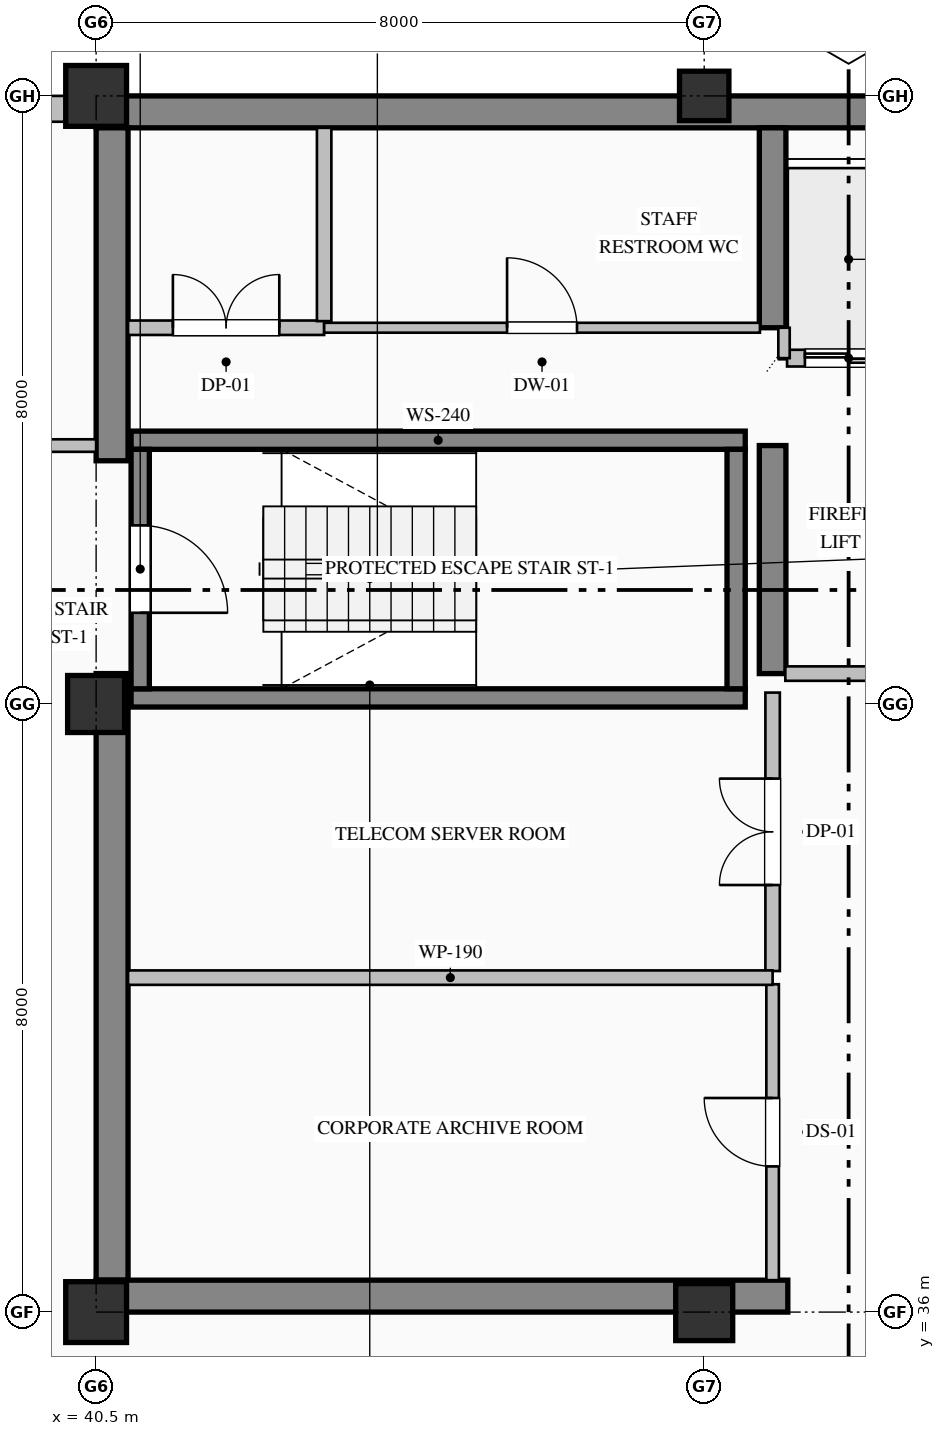
"""IFC4 building model, lengths in metres.
Left out: names, types, materials, properties, quantities, classifications, styles, units other than length and angle.
Written with IfcOpenShell. Run it as: python <this file> out.ifc"""

import sys

from ifc_helpers import new_model, si_unit, direction, frame, frame_2d, origin, origin_2d, place, context, subcontext, project, spatial, rectangle, hollow_rectangle, extrude, element, fill, save


model = new_model("IFC4")
c1 = context("Model", 3, precision=1e-05, world=origin(), true_north=direction((0.0, 1.0)))
c2 = subcontext(c1, "Body", "Model", "MODEL_VIEW")
j1 = project(units=[si_unit("LENGTHUNIT", "METRE"), si_unit("PLANEANGLEUNIT", "RADIAN")], contexts=[c1])
p1 = place(None, origin())
s1 = spatial("IfcSite", under=j1, at=p1, CompositionType="ELEMENT")
p2 = place(p1, origin())
s2 = spatial("IfcBuilding", under=s1, at=p2, CompositionType="ELEMENT")
p3 = place(p2, frame((0.0, 0.0, 359.2)))
s3 = spatial("IfcBuildingStorey", under=s2, at=p3, CompositionType="ELEMENT", Elevation=359.2)
p4 = place(p3, frame((40.5, 51.79, 0.0), z_axis=(0.0, 0.0, 1.0), x_axis=(1.0, 0.0, 0.0)))
e1 = element("IfcWall", 1, at=p4, inside=s3, PredefinedType="SHEAR", context=c2, shape_type="SweptSolid", body=[
    extrude(rectangle(XDim=23.5, YDim=0.42, at=frame_2d((11.75, 0.0))), origin(), (0.0, 0.0, 1.0), 3.785),
])
p5 = place(p3, frame((40.71, 36.42, 0.0), z_axis=(0.0, 0.0, 1.0), x_axis=(0.0, 1.0, 0.0)))
e2 = element("IfcWall", 2, at=p5, inside=s3, PredefinedType="SHEAR", context=c2, shape_type="SweptSolid", body=[
    extrude(rectangle(XDim=7.98, YDim=0.42, at=frame_2d((3.99, 0.0))), origin(), (0.0, 0.0, 1.0), 3.785),
])
p6 = place(p3, frame((40.71, 47.2, 0.0), z_axis=(0.0, 0.0, 1.0), x_axis=(0.0, 1.0, 0.0)))
e3 = element("IfcWall", 3, at=p6, inside=s3, PredefinedType="SHEAR", context=c2, shape_type="SweptSolid", body=[
    extrude(rectangle(XDim=4.38, YDim=0.42, at=frame_2d((2.19, 0.0))), origin(), (0.0, 0.0, 1.0), 3.785),
])
p7 = place(p3, frame((40.5, 36.21, 0.0), z_axis=(0.0, 0.0, 1.0), x_axis=(1.0, 0.0, 0.0)))
e4 = element("IfcWall", 4, at=p7, inside=s3, PredefinedType="SHEAR", context=c2, shape_type="SweptSolid", body=[
    extrude(rectangle(XDim=9.1, YDim=0.42, at=frame_2d((4.55, 0.0))), origin(), (0.0, 0.0, 1.0), 3.785),
])
p8 = place(p3, frame((49.4, 44.4, 0.0), z_axis=(0.0, 0.0, 1.0), x_axis=(0.0, 1.0, 0.0)))
e5 = element("IfcWall", 5, at=p8, inside=s3, PredefinedType="SHEAR", context=c2, shape_type="SweptSolid", body=[
    extrude(rectangle(XDim=3.0, YDim=0.35, at=frame_2d((1.5, 0.0))), origin(), (0.0, 0.0, 1.0), 3.785),
])
p9 = place(p3, frame((49.4, 48.95, 0.0), z_axis=(0.0, 0.0, 1.0), x_axis=(0.0, 1.0, 0.0)))
e6 = element("IfcWall", 6, at=p9, inside=s3, PredefinedType="SHEAR", context=c2, shape_type="SweptSolid", body=[
    extrude(rectangle(XDim=2.63, YDim=0.35, at=frame_2d((1.315, 0.0))), origin(), (0.0, 0.0, 1.0), 3.785),
])
p10 = place(p3, frame((40.5, 36.0, 0.0), z_axis=(0.0, 0.0, 1.0), x_axis=(1.0, 0.0, 0.0)))
e7 = element("IfcColumn", 7, at=p10, inside=s3, PredefinedType="COLUMN", context=c2, shape_type="SweptSolid", body=[
    extrude(hollow_rectangle(XDim=0.8, YDim=0.8, WallThickness=0.032, at=origin_2d()), origin(), (0.0, 0.0, 1.0), 4.0),
])
p11 = place(p3, frame((40.5, 44.0, 0.0), z_axis=(0.0, 0.0, 1.0), x_axis=(1.0, 0.0, 0.0)))
e8 = element("IfcColumn", 8, at=p11, inside=s3, PredefinedType="COLUMN", context=c2, shape_type="SweptSolid", body=[
    extrude(rectangle(XDim=0.75, YDim=0.75, at=origin_2d()), origin(), (0.0, 0.0, 1.0), 4.0),
])
p12 = place(p3, frame((40.5, 52.0, 0.0), z_axis=(0.0, 0.0, 1.0), x_axis=(1.0, 0.0, 0.0)))
e9 = element("IfcColumn", 9, at=p12, inside=s3, PredefinedType="COLUMN", context=c2, shape_type="SweptSolid", body=[
    extrude(hollow_rectangle(XDim=0.8, YDim=0.8, WallThickness=0.032, at=origin_2d()), origin(), (0.0, 0.0, 1.0), 4.0),
])
p13 = place(p3, frame((48.5, 36.0, 0.0), z_axis=(0.0, 0.0, 1.0), x_axis=(1.0, 0.0, 0.0)))
e10 = element("IfcColumn", 10, at=p13, inside=s3, PredefinedType="COLUMN", context=c2, shape_type="SweptSolid", body=[
    extrude(rectangle(XDim=0.75, YDim=0.75, at=origin_2d()), origin(), (0.0, 0.0, 1.0), 4.0),
])
p14 = place(p3, frame((48.5, 52.0, 0.0), z_axis=(0.0, 0.0, 1.0), x_axis=(1.0, 0.0, 0.0)))
e11 = element("IfcColumn", 11, at=p14, inside=s3, PredefinedType="COLUMN", context=c2, shape_type="SweptSolid", body=[
    extrude(hollow_rectangle(XDim=0.65, YDim=0.65, WallThickness=0.028, at=origin_2d()), origin(), (0.0, 0.0, 1.0), 4.0),
])
p15 = place(p3, frame((20.5, 51.83, 0.0), z_axis=(0.0, 0.0, 1.0), x_axis=(1.0, 0.0, 0.0)))
e12 = element("IfcWall", 12, at=p15, inside=s3, PredefinedType="SOLIDWALL", context=c2, shape_type="SweptSolid", body=[
    extrude(rectangle(XDim=20.02, YDim=0.34, at=frame_2d((10.01, 0.0))), origin(), (0.0, 0.0, 1.0), 3.335),
])
p16 = place(p15, frame((6.725, 0.0, 0.9)))
e13 = element("IfcOpeningElement", 13, at=p16, cuts=e12, PredefinedType="OPENING", context=c2, shape_type="SweptSolid", body=[
    extrude(rectangle(XDim=0.95, YDim=1.85, at=frame_2d((0.475, 0.925))), frame((0.0, 0.18, 0.0), z_axis=(0.0, -1.0, 0.0), x_axis=(1.0, 0.0, 0.0)), (0.0, 0.0, 1.0), 0.36),
])
for number, where, z_axis, x_axis in (
    (14, (40.96, 47.47, 0.0), (0.0, 0.0, 1.0), (1.0, 0.0, 0.0)),
    (15, (49.04, 44.08, 0.0), (0.0, 0.0, 1.0), (-1.0, 0.0, 0.0)),
):
    element("IfcWall", number, at=place(p3, frame(where, z_axis=z_axis, x_axis=x_axis)), inside=s3, PredefinedType="SOLIDWALL", context=c2, shape_type="SweptSolid", body=[
        extrude(rectangle(XDim=8.08, YDim=0.24, at=frame_2d((4.04, 0.0))), origin(), (0.0, 0.0, 1.0), 4.0),
    ])
p17 = place(p3, frame((41.08, 47.35, 0.0), z_axis=(0.0, 0.0, 1.0), x_axis=(0.0, -1.0, 0.0)))
e16 = element("IfcWall", 16, at=p17, inside=s3, PredefinedType="SOLIDWALL", context=c2, shape_type="SweptSolid", body=[
    extrude(rectangle(XDim=3.15, YDim=0.24, at=frame_2d((1.575, 0.0))), origin(), (0.0, 0.0, 1.0), 4.0),
])
p18 = place(p17, frame((1.0, 0.0, 0.0)))
e17 = element("IfcOpeningElement", 17, at=p18, cuts=e16, PredefinedType="OPENING", context=c2, shape_type="SweptSolid", body=[
    extrude(rectangle(XDim=1.15, YDim=2.2, at=frame_2d((0.575, 1.1))), frame((0.0, 0.13, 0.0), z_axis=(0.0, -1.0, 0.0), x_axis=(1.0, 0.0, 0.0)), (0.0, 0.0, 1.0), 0.26),
])
p19 = place(p3, frame((48.92, 44.2, 0.0), z_axis=(0.0, 0.0, 1.0), x_axis=(0.0, 1.0, 0.0)))
e18 = element("IfcWall", 18, at=p19, inside=s3, PredefinedType="SOLIDWALL", context=c2, shape_type="SweptSolid", body=[
    extrude(rectangle(XDim=3.15, YDim=0.24, at=frame_2d((1.575, 0.0))), origin(), (0.0, 0.0, 1.0), 4.0),
])
p20 = place(p3, frame((54.71, 48.55, 0.0), z_axis=(0.0, 0.0, 1.0), x_axis=(-1.0, 0.0, 0.0)))
e19 = element("IfcWall", 19, at=p20, inside=s3, PredefinedType="PARTITIONING", context=c2, shape_type="SweptSolid", body=[
    extrude(rectangle(XDim=5.12, YDim=0.22, at=frame_2d((2.56, 0.0))), origin(), (0.0, 0.0, 1.0), 3.785),
])
p21 = place(p20, frame((3.735, 0.0, 0.0)))
e20 = element("IfcOpeningElement", 20, at=p21, cuts=e19, PredefinedType="OPENING", context=c2, shape_type="SweptSolid", body=[
    extrude(rectangle(XDim=1.15, YDim=2.2, at=frame_2d((0.575, 1.1))), frame((0.0, 0.12, 0.0), z_axis=(0.0, -1.0, 0.0), x_axis=(1.0, 0.0, 0.0)), (0.0, 0.0, 1.0), 0.24),
])
p22 = place(p20, frame((0.935, 0.0, 0.0)))
e21 = element("IfcOpeningElement", 21, at=p22, cuts=e19, PredefinedType="OPENING", context=c2, shape_type="SweptSolid", body=[
    extrude(rectangle(XDim=1.15, YDim=2.2, at=frame_2d((0.575, 1.1))), frame((0.0, 0.12, 0.0), z_axis=(0.0, -1.0, 0.0), x_axis=(1.0, 0.0, 0.0)), (0.0, 0.0, 1.0), 0.24),
])
p23 = place(p3, frame((49.55, 48.55, 0.0), z_axis=(0.0, 0.0, 1.0), x_axis=(0.0, 1.0, 0.0)))
e22 = element("IfcWall", 22, at=p23, inside=s3, PredefinedType="PARTITIONING", context=c2, shape_type="SweptSolid", body=[
    extrude(rectangle(XDim=0.4, YDim=0.15, at=frame_2d((0.2, 0.0))), origin(), (0.0, 0.0, 1.0), 3.785),
])
p24 = place(p3, frame((37.8, 47.4, 0.0), z_axis=(0.0, 0.0, 1.0), x_axis=(1.0, 0.0, 0.0)))
e23 = element("IfcWall", 23, at=p24, inside=s3, PredefinedType="PARTITIONING", context=c2, shape_type="SweptSolid", body=[
    extrude(rectangle(XDim=2.7, YDim=0.165, at=frame_2d((1.35, 0.0))), origin(), (0.0, 0.0, 1.0), 3.785),
])
p25 = place(p24, frame((0.825, 0.0, 0.0)))
e24 = element("IfcOpeningElement", 24, at=p25, cuts=e23, PredefinedType="OPENING", context=c2, shape_type="SweptSolid", body=[
    extrude(rectangle(XDim=1.05, YDim=2.15, at=frame_2d((0.525, 1.075))), frame((0.0, 0.093, 0.0), z_axis=(0.0, -1.0, 0.0), x_axis=(1.0, 0.0, 0.0)), (0.0, 0.0, 1.0), 0.185),
])
p26 = place(p3, frame((40.92, 48.95, 0.0), z_axis=(0.0, 0.0, 1.0), x_axis=(1.0, 0.0, 0.0)))
e25 = element("IfcWall", 25, at=p26, inside=s3, PredefinedType="PARTITIONING", context=c2, shape_type="SweptSolid", body=[
    extrude(rectangle(XDim=2.58, YDim=0.19, at=frame_2d((1.29, 0.0))), origin(), (0.0, 0.0, 1.0), 3.785),
])
p27 = place(p26, frame((0.59, 0.0, 0.0)))
e26 = element("IfcOpeningElement", 26, at=p27, cuts=e25, PredefinedType="OPENING", context=c2, shape_type="SweptSolid", body=[
    extrude(rectangle(XDim=1.4, YDim=2.25, at=frame_2d((0.7, 1.125))), frame((0.0, 0.105, 0.0), z_axis=(0.0, -1.0, 0.0), x_axis=(1.0, 0.0, 0.0)), (0.0, 0.0, 1.0), 0.21),
])
p28 = place(p3, frame((43.5, 48.95, 0.0), z_axis=(0.0, 0.0, 1.0), x_axis=(1.0, 0.0, 0.0)))
e27 = element("IfcWall", 27, at=p28, inside=s3, PredefinedType="PARTITIONING", context=c2, shape_type="SweptSolid", body=[
    extrude(rectangle(XDim=5.733, YDim=0.13, at=frame_2d((2.866, 0.0))), origin(), (0.0, 0.0, 1.0), 3.785),
])
p29 = place(p28, frame((2.406, 0.0, 0.0)))
e28 = element("IfcOpeningElement", 28, at=p29, cuts=e27, PredefinedType="OPENING", context=c2, shape_type="SweptSolid", body=[
    extrude(rectangle(XDim=0.92, YDim=2.15, at=frame_2d((0.46, 1.075))), frame((0.0, 0.075, 0.0), z_axis=(0.0, -1.0, 0.0), x_axis=(1.0, 0.0, 0.0)), (0.0, 0.0, 1.0), 0.15),
])
p30 = place(p3, frame((54.733, 44.4, 0.0), z_axis=(0.0, 0.0, 1.0), x_axis=(-1.0, 0.0, 0.0)))
e29 = element("IfcWall", 29, at=p30, inside=s3, PredefinedType="PARTITIONING", context=c2, shape_type="SweptSolid", body=[
    extrude(rectangle(XDim=5.166, YDim=0.19, at=frame_2d((2.583, 0.0))), origin(), (0.0, 0.0, 1.0), 3.785),
])
p31 = place(p30, frame((2.058, 0.0, 0.0)))
e30 = element("IfcOpeningElement", 30, at=p31, cuts=e29, PredefinedType="OPENING", context=c2, shape_type="SweptSolid", body=[
    extrude(rectangle(XDim=1.05, YDim=2.15, at=frame_2d((0.525, 1.075))), frame((0.0, 0.105, 0.0), z_axis=(0.0, -1.0, 0.0), x_axis=(1.0, 0.0, 0.0)), (0.0, 0.0, 1.0), 0.21),
])
p32 = place(p3, frame((49.4, 36.42, 0.0), z_axis=(0.0, 0.0, 1.0), x_axis=(0.0, 1.0, 0.0)))
e31 = element("IfcWall", 31, at=p32, inside=s3, PredefinedType="PARTITIONING", context=c2, shape_type="SweptSolid", body=[
    extrude(rectangle(XDim=3.893, YDim=0.165, at=frame_2d((1.947, 0.0))), origin(), (0.0, 0.0, 1.0), 3.027),
])
p33 = place(p32, frame((1.497, 0.0, 0.0)))
e32 = element("IfcOpeningElement", 32, at=p33, cuts=e31, PredefinedType="OPENING", context=c2, shape_type="SweptSolid", body=[
    extrude(rectangle(XDim=0.9, YDim=2.15, at=frame_2d((0.45, 1.075))), frame((0.0, 0.093, 0.0), z_axis=(0.0, -1.0, 0.0), x_axis=(1.0, 0.0, 0.0)), (0.0, 0.0, 1.0), 0.185),
])
p34 = place(p3, frame((49.4, 40.487, 0.0), z_axis=(0.0, 0.0, 1.0), x_axis=(0.0, 1.0, 0.0)))
e33 = element("IfcWall", 33, at=p34, inside=s3, PredefinedType="PARTITIONING", context=c2, shape_type="SweptSolid", body=[
    extrude(rectangle(XDim=3.663, YDim=0.19, at=frame_2d((1.832, 0.0))), origin(), (0.0, 0.0, 1.0), 3.027),
])
p35 = place(p34, frame((1.132, 0.0, 0.0)))
e34 = element("IfcOpeningElement", 34, at=p35, cuts=e33, PredefinedType="OPENING", context=c2, shape_type="SweptSolid", body=[
    extrude(rectangle(XDim=1.4, YDim=2.25, at=frame_2d((0.7, 1.125))), frame((0.0, 0.105, 0.0), z_axis=(0.0, -1.0, 0.0), x_axis=(1.0, 0.0, 0.0)), (0.0, 0.0, 1.0), 0.21),
])
p36 = place(p3, frame((40.92, 40.4, 0.0), z_axis=(0.0, 0.0, 1.0), x_axis=(1.0, 0.0, 0.0)))
e35 = element("IfcWall", 35, at=p36, inside=s3, PredefinedType="PARTITIONING", context=c2, shape_type="SweptSolid", body=[
    extrude(rectangle(XDim=8.48, YDim=0.19, at=frame_2d((4.24, 0.0))), origin(), (0.0, 0.0, 1.0), 3.785),
])
p37 = place(p3, frame((43.5, 51.58, 0.0), z_axis=(0.0, 0.0, 1.0), x_axis=(0.0, -1.0, 0.0)))
e36 = element("IfcWall", 36, at=p37, inside=s3, PredefinedType="PARTITIONING", context=c2, shape_type="SweptSolid", body=[
    extrude(rectangle(XDim=2.543, YDim=0.19, at=frame_2d((1.271, 0.0))), origin(), (0.0, 0.0, 1.0), 3.785),
])
p38 = place(p18, origin())
e37 = element("IfcDoor", 37, at=p38, inside=s3, OperationType="SINGLE_SWING_RIGHT", PredefinedType="DOOR", context=c2, shape_type="SweptSolid", body=[
    extrude(rectangle(XDim=1.15, YDim=2.2, at=frame_2d((0.575, 1.1))), frame((0.0, 0.025, 0.0), z_axis=(0.0, -1.0, 0.0), x_axis=(1.0, 0.0, 0.0)), (0.0, 0.0, 1.0), 0.05),
])
fill(e17, e37)
p39 = place(p21, origin())
e38 = element("IfcDoor", 38, at=p39, inside=s3, OperationType="DOUBLE_DOOR_SLIDING", PredefinedType="DOOR", context=c2, shape_type="SweptSolid", body=[
    extrude(rectangle(XDim=1.15, YDim=2.2, at=frame_2d((0.575, 1.1))), frame((0.0, 0.025, 0.0), z_axis=(0.0, -1.0, 0.0), x_axis=(1.0, 0.0, 0.0)), (0.0, 0.0, 1.0), 0.05),
])
fill(e20, e38)
p40 = place(p33, origin())
e39 = element("IfcDoor", 39, at=p40, inside=s3, OperationType="SINGLE_SWING_RIGHT", PredefinedType="DOOR", context=c2, shape_type="SweptSolid", body=[
    extrude(rectangle(XDim=0.9, YDim=2.15, at=frame_2d((0.45, 1.075))), frame((0.0, 0.025, 0.0), z_axis=(0.0, -1.0, 0.0), x_axis=(1.0, 0.0, 0.0)), (0.0, 0.0, 1.0), 0.05),
])
fill(e32, e39)
p41 = place(p35, origin())
e40 = element("IfcDoor", 40, at=p41, inside=s3, OperationType="DOUBLE_DOOR_SINGLE_SWING", PredefinedType="DOOR", context=c2, shape_type="SweptSolid", body=[
    extrude(rectangle(XDim=1.4, YDim=2.25, at=frame_2d((0.7, 1.125))), frame((0.0, 0.025, 0.0), z_axis=(0.0, -1.0, 0.0), x_axis=(1.0, 0.0, 0.0)), (0.0, 0.0, 1.0), 0.05),
])
fill(e34, e40)
p42 = place(p27, origin())
e41 = element("IfcDoor", 41, at=p42, inside=s3, OperationType="DOUBLE_DOOR_SINGLE_SWING", PredefinedType="DOOR", context=c2, shape_type="SweptSolid", body=[
    extrude(rectangle(XDim=1.4, YDim=2.25, at=frame_2d((0.7, 1.125))), frame((0.0, 0.025, 0.0), z_axis=(0.0, -1.0, 0.0), x_axis=(1.0, 0.0, 0.0)), (0.0, 0.0, 1.0), 0.05),
])
fill(e26, e41)
p43 = place(p29, origin())
e42 = element("IfcDoor", 42, at=p43, inside=s3, OperationType="SINGLE_SWING_LEFT", PredefinedType="DOOR", context=c2, shape_type="SweptSolid", body=[
    extrude(rectangle(XDim=0.92, YDim=2.15, at=frame_2d((0.46, 1.075))), frame((0.0, 0.025, 0.0), z_axis=(0.0, -1.0, 0.0), x_axis=(1.0, 0.0, 0.0)), (0.0, 0.0, 1.0), 0.05),
])
fill(e28, e42)
save(model, sys.argv[1])
